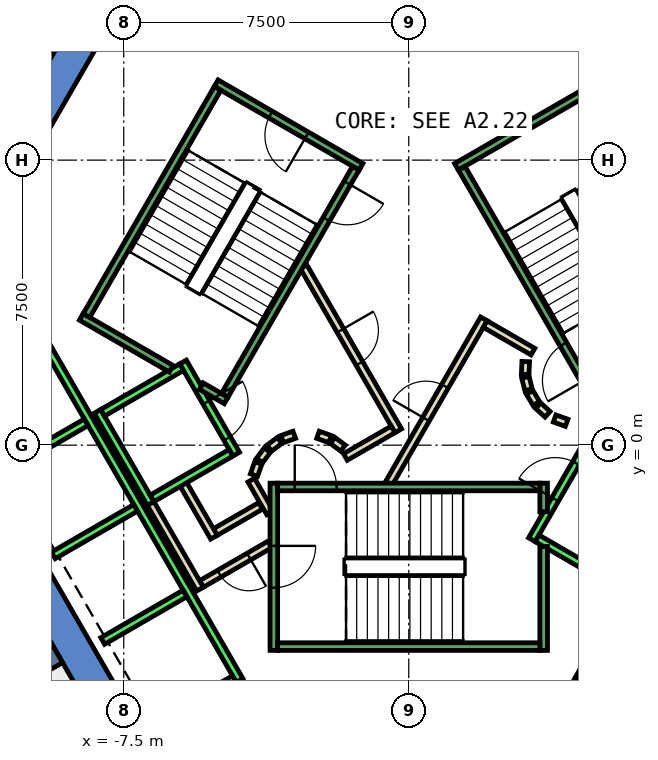
"""IFC4 building model, lengths in metres.
Left out: names, types, materials, properties, quantities, classifications, styles, units other than length and angle.
Written with IfcOpenShell. Run it as: python <this file> out.ifc"""

import sys

from ifc_helpers import new_model, si_unit, direction, frame, frame_2d, origin, place, context, subcontext, project, spatial, polyline, rectangle, outline, extrude, element, fill, save


model = new_model("IFC4")
c1 = context("Model", 3, precision=1e-05, world=origin(), true_north=direction((0.0, 1.0)))
c2 = subcontext(c1, "Body", "Model", "MODEL_VIEW")
j1 = project(units=[si_unit("LENGTHUNIT", "METRE"), si_unit("PLANEANGLEUNIT", "RADIAN")], contexts=[c1])
p1 = place(None, origin())
s1 = spatial("IfcSite", under=j1, at=p1, CompositionType="ELEMENT")
p2 = place(p1, origin())
s2 = spatial("IfcBuilding", under=s1, at=p2, CompositionType="ELEMENT")
p3 = place(p2, frame((0.0, 0.0, 103.4)))
s3 = spatial("IfcBuildingStorey", under=s2, at=p3, CompositionType="ELEMENT", Elevation=103.4)
p4 = place(p3, frame((0.0, 0.0, -0.4)))
e1 = element("IfcWall", 1, at=p4, inside=s3, PredefinedType="SHEAR", context=c2, shape_type="SweptSolid", body=[
    extrude(outline(polyline([(-12.267, 5.252), (-11.488, 4.802), (-6.409, 13.6), (-6.928, 14.5), (-12.267, 5.252)])), origin(), (0.0, 0.0, 1.0), 4.2),
])
p5 = place(p3, frame((0.0, 0.0, -0.4)))
e2 = element("IfcWall", 2, at=p5, inside=s3, PredefinedType="SHEAR", context=c2, shape_type="SweptSolid", body=[
    extrude(outline(polyline([(-13.856, 2.5), (-6.928, -9.5), (-6.409, -8.6), (-12.817, 2.5), (-13.856, 2.5)])), origin(), (0.0, 0.0, 1.0), 4.2),
])
p6 = place(p3, frame((-9.31, -5.375, -0.4), z_axis=(0.0, 0.0, 1.0), x_axis=(-0.866017533419, -0.500013631625, 0.0)))
e3 = element("IfcWall", 3, at=p6, inside=s3, PredefinedType="SHEAR", context=c2, shape_type="SweptSolid", body=[
    extrude(rectangle(XDim=9.0, YDim=0.8, at=frame_2d((4.5, 0.0))), origin(), (0.0, 0.0, 1.0), 4.2),
])
p7 = place(p3, frame((-3.9, -1.599, 0.0), z_axis=(0.0, 0.0, 1.0), x_axis=(-0.865969445389, -0.500096910261, 0.0)))
e4 = element("IfcWall", 4, at=p7, inside=s3, PredefinedType="PARTITIONING", context=c2, shape_type="SweptSolid", body=[
    extrude(rectangle(XDim=1.373, YDim=0.2, at=frame_2d((0.687, 0.0))), origin(), (0.0, 0.0, 1.0), 3.8),
])
p8 = place(p3, frame((-5.126, -2.422, 0.0), z_axis=(0.0, 0.0, 1.0), x_axis=(-0.500062241894, 0.865989465428, 0.0)))
e5 = element("IfcWall", 5, at=p8, inside=s3, PredefinedType="PARTITIONING", context=c2, shape_type="SweptSolid", body=[
    extrude(rectangle(XDim=1.7, YDim=0.2, at=frame_2d((0.85, 0.0))), origin(), (0.0, 0.0, 1.0), 3.8),
])
p9 = place(p3, frame((-3.65, -2.61, 0.0), z_axis=(0.0, 0.0, 1.0), x_axis=(-0.866072462134, -0.499918483688, 0.0)))
e6 = element("IfcWall", 6, at=p9, inside=s3, PredefinedType="PARTITIONING", context=c2, shape_type="SweptSolid", body=[
    extrude(rectangle(XDim=2.084, YDim=0.2, at=frame_2d((1.042, 0.0))), origin(), (0.0, 0.0, 1.0), 3.8),
])
p10 = place(p9, frame((0.642, 0.0, 0.0)))
e7 = element("IfcOpeningElement", 7, at=p10, cuts=e6, PredefinedType="OPENING", context=c2, shape_type="SweptSolid", body=[
    extrude(rectangle(XDim=0.9, YDim=2.1, at=frame_2d((0.45, 1.05))), frame((0.0, 0.11, 0.0), z_axis=(0.0, -1.0, 0.0), x_axis=(1.0, 0.0, 0.0)), (0.0, 0.0, 1.0), 0.22),
])
p11 = place(p3, frame((-5.492, -3.788, 0.0), z_axis=(0.0, 0.0, 1.0), x_axis=(-0.500008949224, 0.866020236886, 0.0)))
e8 = element("IfcWall", 8, at=p11, inside=s3, PredefinedType="PARTITIONING", context=c2, shape_type="SweptSolid", body=[
    extrude(rectangle(XDim=2.68, YDim=0.2, at=frame_2d((1.34, 0.0))), origin(), (0.0, 0.0, 1.0), 3.8),
])
p12 = place(p3, frame((-4.145, -0.92, 0.0), z_axis=(0.0, 0.0, 1.0), x_axis=(0.499743786207, -0.866173278362, 0.0)))
e9 = element("IfcWall", 9, at=p12, inside=s3, PredefinedType="PARTITIONING", context=c2, shape_type="SweptSolid", body=[
    extrude(rectangle(XDim=0.991, YDim=0.2, at=frame_2d((0.495, 0.0))), origin(), (0.0, 0.0, 1.0), 3.8),
])
p13 = place(p3, frame((-0.52, -1.0, 0.0), z_axis=(0.0, 0.0, 1.0), x_axis=(0.50011622646, 0.865958290007, 0.0)))
e10 = element("IfcWall", 10, at=p13, inside=s3, PredefinedType="PARTITIONING", context=c2, shape_type="SweptSolid", body=[
    extrude(rectangle(XDim=4.991, YDim=0.2, at=frame_2d((2.496, 0.0))), origin(), (0.0, 0.0, 1.0), 3.8),
])
p14 = place(p13, frame((1.945, 0.0, 0.0)))
e11 = element("IfcOpeningElement", 11, at=p14, cuts=e10, PredefinedType="OPENING", context=c2, shape_type="SweptSolid", body=[
    extrude(rectangle(XDim=1.0, YDim=2.1, at=frame_2d((0.5, 1.05))), frame((0.0, 0.11, 0.0), z_axis=(0.0, -1.0, 0.0), x_axis=(1.0, 0.0, 0.0)), (0.0, 0.0, 1.0), 0.22),
])
p15 = place(p3, frame((2.012, 3.186, 0.0), z_axis=(0.0, 0.0, 1.0), x_axis=(0.865891012941, -0.500232699559, 0.0)))
e12 = element("IfcWall", 12, at=p15, inside=s3, PredefinedType="PARTITIONING", context=c2, shape_type="SweptSolid", body=[
    extrude(rectangle(XDim=1.449, YDim=0.2, at=frame_2d((0.725, 0.0))), origin(), (0.0, 0.0, 1.0), 3.8),
])
p16 = place(p3, frame((3.079, 2.199, 0.0), z_axis=(0.0, 0.0, 1.0), x_axis=(-0.047771483479, -0.998858290933, 0.0)))
e13 = element("IfcWall", 13, at=p16, inside=s3, PredefinedType="PARTITIONING", context=c2, shape_type="SweptSolid", body=[
    extrude(rectangle(XDim=0.337, YDim=0.2, at=frame_2d((0.169, 0.0))), origin(), (0.0, 0.0, 1.0), 3.8),
])
p17 = place(p3, frame((3.07, 1.786, 0.0), z_axis=(0.0, 0.0, 1.0), x_axis=(0.242705583207, -0.970099994784, 0.0)))
e14 = element("IfcWall", 14, at=p17, inside=s3, PredefinedType="PARTITIONING", context=c2, shape_type="SweptSolid", body=[
    extrude(rectangle(XDim=0.338, YDim=0.2, at=frame_2d((0.169, 0.0))), origin(), (0.0, 0.0, 1.0), 3.8),
])
for number, where, z_axis, x_axis in (
    (15, (3.182, 1.388, 0.0), (0.0, 0.0, 1.0), (0.512, -0.859, 0.0)),
    (16, (3.404, 1.039, 0.0), (0.0, 0.0, 1.0), (0.74, -0.672, 0.0)),
):
    element("IfcWall", number, at=place(p3, frame(where, z_axis=z_axis, x_axis=x_axis)), inside=s3, PredefinedType="PARTITIONING", context=c2, shape_type="SweptSolid", body=[
        extrude(rectangle(XDim=0.338, YDim=0.2, at=frame_2d((0.169, 0.0))), origin(), (0.0, 0.0, 1.0), 3.8),
    ])
p18 = place(p3, frame((3.838, 0.702, 0.0), z_axis=(0.0, 0.0, 1.0), x_axis=(0.941035081519, -0.338308993895, 0.0)))
e17 = element("IfcWall", 17, at=p18, inside=s3, PredefinedType="PARTITIONING", context=c2, shape_type="SweptSolid", body=[
    extrude(rectangle(XDim=0.337, YDim=0.2, at=frame_2d((0.168, 0.0))), origin(), (0.0, 0.0, 1.0), 3.8),
])
p19 = place(p3, frame((-2.771, 4.7, 0.0), z_axis=(0.0, 0.0, 1.0), x_axis=(0.499969479948, -0.866043023828, 0.0)))
e18 = element("IfcWall", 18, at=p19, inside=s3, PredefinedType="PARTITIONING", context=c2, shape_type="SweptSolid", body=[
    extrude(rectangle(XDim=4.99, YDim=0.2, at=frame_2d((2.495, 0.0))), origin(), (0.0, 0.0, 1.0), 3.8),
])
p20 = place(p19, frame((1.945, 0.0, 0.0)))
e19 = element("IfcOpeningElement", 19, at=p20, cuts=e18, PredefinedType="OPENING", context=c2, shape_type="SweptSolid", body=[
    extrude(rectangle(XDim=1.0, YDim=2.1, at=frame_2d((0.5, 1.05))), frame((0.0, 0.11, 0.0), z_axis=(0.0, -1.0, 0.0), x_axis=(1.0, 0.0, 0.0)), (0.0, 0.0, 1.0), 0.22),
])
p21 = place(p3, frame((-0.412, 0.414, 0.0), z_axis=(0.0, 0.0, 1.0), x_axis=(-0.866017369001, -0.500013916395, 0.0)))
e20 = element("IfcWall", 20, at=p21, inside=s3, PredefinedType="PARTITIONING", context=c2, shape_type="SweptSolid", body=[
    extrude(rectangle(XDim=1.45, YDim=0.2, at=frame_2d((0.725, 0.0))), origin(), (0.0, 0.0, 1.0), 3.8),
])
p22 = place(p3, frame((-1.731, -0.077, 0.0), z_axis=(0.0, 0.0, 1.0), x_axis=(-0.804311165252, 0.594208338422, 0.0)))
e21 = element("IfcWall", 21, at=p22, inside=s3, PredefinedType="PARTITIONING", context=c2, shape_type="SweptSolid", body=[
    extrude(rectangle(XDim=0.338, YDim=0.2, at=frame_2d((0.169, 0.0))), origin(), (0.0, 0.0, 1.0), 3.8),
])
p23 = place(p3, frame((-2.07, 0.16, 0.0), z_axis=(0.0, 0.0, 1.0), x_axis=(-0.942199461132, 0.335052496547, 0.0)))
e22 = element("IfcWall", 22, at=p23, inside=s3, PredefinedType="PARTITIONING", context=c2, shape_type="SweptSolid", body=[
    extrude(rectangle(XDim=0.337, YDim=0.2, at=frame_2d((0.169, 0.0))), origin(), (0.0, 0.0, 1.0), 3.8),
])
p24 = place(p3, frame((-3.012, 0.273, 0.0), z_axis=(0.0, 0.0, 1.0), x_axis=(-0.942280615813, -0.334824194261, 0.0)))
e23 = element("IfcWall", 23, at=p24, inside=s3, PredefinedType="PARTITIONING", context=c2, shape_type="SweptSolid", body=[
    extrude(rectangle(XDim=0.338, YDim=0.2, at=frame_2d((0.169, 0.0))), origin(), (0.0, 0.0, 1.0), 3.8),
])
p25 = place(p3, frame((-3.397, 0.124, 0.0), z_axis=(0.0, 0.0, 1.0), x_axis=(-0.804311165252, -0.594208338422, 0.0)))
e24 = element("IfcWall", 24, at=p25, inside=s3, PredefinedType="PARTITIONING", context=c2, shape_type="SweptSolid", body=[
    extrude(rectangle(XDim=0.338, YDim=0.2, at=frame_2d((0.169, 0.0))), origin(), (0.0, 0.0, 1.0), 3.8),
])
p26 = place(p3, frame((-3.723, -0.131, 0.0), z_axis=(0.0, 0.0, 1.0), x_axis=(-0.594675113454, -0.803966112121, 0.0)))
e25 = element("IfcWall", 25, at=p26, inside=s3, PredefinedType="PARTITIONING", context=c2, shape_type="SweptSolid", body=[
    extrude(rectangle(XDim=0.338, YDim=0.2, at=frame_2d((0.169, 0.0))), origin(), (0.0, 0.0, 1.0), 3.8),
])
p27 = place(p3, frame((-3.96, -0.47, 0.0), z_axis=(0.0, 0.0, 1.0), x_axis=(-0.334824194261, -0.942280615813, 0.0)))
e26 = element("IfcWall", 26, at=p27, inside=s3, PredefinedType="PARTITIONING", context=c2, shape_type="SweptSolid", body=[
    extrude(rectangle(XDim=0.338, YDim=0.2, at=frame_2d((0.169, 0.0))), origin(), (0.0, 0.0, 1.0), 3.8),
])
p28 = place(p3, frame((-5.94, 2.188, 0.0), z_axis=(0.0, 0.0, 1.0), x_axis=(0.49994636267, -0.866056369097, 0.0)))
e27 = element("IfcWall", 27, at=p28, inside=s3, PredefinedType="STANDARD", context=c2, shape_type="SweptSolid", body=[
    extrude(rectangle(XDim=2.8, YDim=0.2, at=frame_2d((1.4, 0.0))), origin(), (0.0, 0.0, 1.0), 3.8),
])
p29 = place(p28, frame((1.225, 0.0, 0.0)))
e28 = element("IfcOpeningElement", 28, at=p29, cuts=e27, PredefinedType="OPENING", context=c2, shape_type="SweptSolid", body=[
    extrude(rectangle(XDim=1.1, YDim=2.1, at=frame_2d((0.55, 1.05))), frame((0.0, 0.11, 0.0), z_axis=(0.0, -1.0, 0.0), x_axis=(1.0, 0.0, 0.0)), (0.0, 0.0, 1.0), 0.22),
])
p30 = place(p3, frame((-8.192, 0.888, 0.0), z_axis=(0.0, 0.0, 1.0), x_axis=(0.49994636267, -0.866056369097, 0.0)))
e29 = element("IfcWall", 29, at=p30, inside=s3, PredefinedType="STANDARD", context=c2, shape_type="SweptSolid", body=[
    extrude(rectangle(XDim=2.8, YDim=0.2, at=frame_2d((1.4, 0.0))), origin(), (0.0, 0.0, 1.0), 3.8),
])
for number, where, z_axis, x_axis in (
    (30, (-5.977, 2.052, 0.0), (0.0, 0.0, 1.0), (-0.866, -0.5, 0.0)),
    (31, (-4.677, -0.2, 0.0), (0.0, 0.0, 1.0), (-0.866, -0.5, 0.0)),
):
    element("IfcWall", number, at=place(p3, frame(where, z_axis=z_axis, x_axis=x_axis)), inside=s3, PredefinedType="STANDARD", context=c2, shape_type="SweptSolid", body=[
        extrude(rectangle(XDim=2.399, YDim=0.2, at=frame_2d((1.2, 0.0))), origin(), (0.0, 0.0, 1.0), 3.8),
    ])
p31 = place(p3, frame((-9.751, 2.99, 0.0), z_axis=(0.0, 0.0, 1.0), x_axis=(0.50000090737, -0.866024879913, 0.0)))
e32 = element("IfcWall", 32, at=p31, inside=s3, PredefinedType="STANDARD", context=c2, shape_type="SweptSolid", body=[
    extrude(rectangle(XDim=10.6, YDim=0.2, at=frame_2d((5.3, 0.0))), origin(), (0.0, 0.0, 1.0), 3.8),
])
for number, where, z_axis, x_axis in (
    (33, (-8.488, 0.602, 0.0), (0.0, 0.0, 1.0), (-0.866, -0.5, 0.0)),
    (34, (-7.188, -1.65, 0.0), (0.0, 0.0, 1.0), (-0.866, -0.5, 0.0)),
    (35, (-5.888, -3.902, 0.0), (0.0, 0.0, 1.0), (-0.866, -0.5, 0.0)),
    (36, (-4.588, -6.153, 0.0), (0.0, 0.0, 1.0), (-0.866, -0.5, 0.0)),
):
    element("IfcWall", number, at=place(p3, frame(where, z_axis=z_axis, x_axis=x_axis)), inside=s3, PredefinedType="STANDARD", context=c2, shape_type="SweptSolid", body=[
        extrude(rectangle(XDim=2.5, YDim=0.2, at=frame_2d((1.25, 0.0))), origin(), (0.0, 0.0, 1.0), 3.8),
    ])
p32 = place(p3, frame((3.24, -2.488, 0.0), z_axis=(0.0, 0.0, 1.0), x_axis=(0.49994636267, 0.866056369097, 0.0)))
e37 = element("IfcWall", 37, at=p32, inside=s3, PredefinedType="STANDARD", context=c2, shape_type="SweptSolid", body=[
    extrude(rectangle(XDim=2.8, YDim=0.2, at=frame_2d((1.4, 0.0))), origin(), (0.0, 0.0, 1.0), 3.8),
])
p33 = place(p32, frame((1.225, 0.0, 0.0)))
e38 = element("IfcOpeningElement", 38, at=p33, cuts=e37, PredefinedType="OPENING", context=c2, shape_type="SweptSolid", body=[
    extrude(rectangle(XDim=1.1, YDim=2.1, at=frame_2d((0.55, 1.05))), frame((0.0, 0.11, 0.0), z_axis=(0.0, -1.0, 0.0), x_axis=(1.0, 0.0, 0.0)), (0.0, 0.0, 1.0), 0.22),
])
p34 = place(p3, frame((3.377, -2.452, 0.0), z_axis=(0.0, 0.0, 1.0), x_axis=(0.865955154139, -0.50012165622, 0.0)))
e39 = element("IfcWall", 39, at=p34, inside=s3, PredefinedType="STANDARD", context=c2, shape_type="SweptSolid", body=[
    extrude(rectangle(XDim=2.4, YDim=0.2, at=frame_2d((1.2, 0.0))), origin(), (0.0, 0.0, 1.0), 3.8),
])
p35 = place(p3, frame((4.451, -6.19, 0.0), z_axis=(0.0, 0.0, 1.0), x_axis=(0.50000090737, 0.866024879913, 0.0)))
e40 = element("IfcWall", 40, at=p35, inside=s3, PredefinedType="STANDARD", context=c2, shape_type="SweptSolid", body=[
    extrude(rectangle(XDim=10.6, YDim=0.2, at=frame_2d((5.3, 0.0))), origin(), (0.0, 0.0, 1.0), 3.8),
])
p36 = place(p3, frame((-3.55, -1.0, 0.0), z_axis=(0.0, 0.0, 1.0), x_axis=(0.0, -1.0, 0.0)))
e41 = element("IfcWall", 41, at=p36, inside=s3, PredefinedType="STANDARD", context=c2, shape_type="SweptSolid", body=[
    extrude(rectangle(XDim=4.4, YDim=0.2, at=frame_2d((2.2, 0.0))), origin(), (0.0, 0.0, 1.0), 3.8),
])
p37 = place(p36, frame((1.65, 0.0, 0.0)))
e42 = element("IfcOpeningElement", 42, at=p37, cuts=e41, PredefinedType="OPENING", context=c2, shape_type="SweptSolid", body=[
    extrude(rectangle(XDim=1.1, YDim=2.2, at=frame_2d((0.55, 1.1))), frame((0.0, 0.11, 0.0), z_axis=(0.0, -1.0, 0.0), x_axis=(1.0, 0.0, 0.0)), (0.0, 0.0, 1.0), 0.22),
])
p38 = place(p3, frame((3.55, -2.667, 0.0), z_axis=(0.0, 0.0, 1.0), x_axis=(0.0, -1.0, 0.0)))
e43 = element("IfcWall", 43, at=p38, inside=s3, PredefinedType="STANDARD", context=c2, shape_type="SweptSolid", body=[
    extrude(rectangle(XDim=2.733, YDim=0.2, at=frame_2d((1.366, 0.0))), origin(), (0.0, 0.0, 1.0), 3.8),
])
p39 = place(p3, frame((3.55, -1.0, 0.0), z_axis=(0.0, 0.0, 1.0), x_axis=(0.0, -1.0, 0.0)))
e44 = element("IfcWall", 44, at=p39, inside=s3, PredefinedType="STANDARD", context=c2, shape_type="SweptSolid", body=[
    extrude(rectangle(XDim=0.751, YDim=0.2, at=frame_2d((0.375, 0.0))), origin(), (0.0, 0.0, 1.0), 3.8),
])
p40 = place(p3, frame((-3.45, -1.1, 0.0), z_axis=(0.0, 0.0, 1.0), x_axis=(1.0, 0.0, 0.0)))
e45 = element("IfcWall", 45, at=p40, inside=s3, PredefinedType="STANDARD", context=c2, shape_type="SweptSolid", body=[
    extrude(rectangle(XDim=6.9, YDim=0.2, at=frame_2d((3.45, 0.0))), origin(), (0.0, 0.0, 1.0), 3.8),
])
p41 = place(p40, frame((0.45, 0.0, 0.0)))
e46 = element("IfcOpeningElement", 46, at=p41, cuts=e45, PredefinedType="OPENING", context=c2, shape_type="SweptSolid", body=[
    extrude(rectangle(XDim=1.1, YDim=2.2, at=frame_2d((0.55, 1.1))), frame((0.0, 0.11, 0.0), z_axis=(0.0, -1.0, 0.0), x_axis=(1.0, 0.0, 0.0)), (0.0, 0.0, 1.0), 0.22),
])
p42 = place(p3, frame((-3.45, -5.3, 0.0), z_axis=(0.0, 0.0, 1.0), x_axis=(1.0, 0.0, 0.0)))
e47 = element("IfcWall", 47, at=p42, inside=s3, PredefinedType="STANDARD", context=c2, shape_type="SweptSolid", body=[
    extrude(rectangle(XDim=6.9, YDim=0.2, at=frame_2d((3.45, 0.0))), origin(), (0.0, 0.0, 1.0), 3.8),
])
p43 = place(p3, frame((1.256, 7.324, 0.0), z_axis=(0.0, 0.0, 1.0), x_axis=(0.866046073146, 0.499964197906, 0.0)))
e48 = element("IfcWall", 48, at=p43, inside=s3, PredefinedType="STANDARD", context=c2, shape_type="SweptSolid", body=[
    extrude(rectangle(XDim=4.4, YDim=0.2, at=frame_2d((2.2, 0.0))), origin(), (0.0, 0.0, 1.0), 3.8),
])
p44 = place(p3, frame((4.843, 1.312, 0.0), z_axis=(0.0, 0.0, 1.0), x_axis=(-0.499963383562, 0.866046543262, 0.0)))
e49 = element("IfcWall", 49, at=p44, inside=s3, PredefinedType="STANDARD", context=c2, shape_type="SweptSolid", body=[
    extrude(rectangle(XDim=6.9, YDim=0.2, at=frame_2d((3.45, 0.0))), origin(), (0.0, 0.0, 1.0), 3.8),
])
p45 = place(p44, frame((0.45, 0.0, 0.0)))
e50 = element("IfcOpeningElement", 50, at=p45, cuts=e49, PredefinedType="OPENING", context=c2, shape_type="SweptSolid", body=[
    extrude(rectangle(XDim=1.1, YDim=2.2, at=frame_2d((0.55, 1.1))), frame((0.0, 0.11, 0.0), z_axis=(0.0, -1.0, 0.0), x_axis=(1.0, 0.0, 0.0)), (0.0, 0.0, 1.0), 0.22),
])
p46 = place(p3, frame((-1.256, 7.324, 0.0), z_axis=(0.0, 0.0, 1.0), x_axis=(-0.866046073146, 0.499964197906, 0.0)))
e51 = element("IfcWall", 51, at=p46, inside=s3, PredefinedType="STANDARD", context=c2, shape_type="SweptSolid", body=[
    extrude(rectangle(XDim=4.4, YDim=0.2, at=frame_2d((2.2, 0.0))), origin(), (0.0, 0.0, 1.0), 3.8),
])
p47 = place(p46, frame((1.65, 0.0, 0.0)))
e52 = element("IfcOpeningElement", 52, at=p47, cuts=e51, PredefinedType="OPENING", context=c2, shape_type="SweptSolid", body=[
    extrude(rectangle(XDim=1.1, YDim=2.2, at=frame_2d((0.55, 1.1))), frame((0.0, 0.11, 0.0), z_axis=(0.0, -1.0, 0.0), x_axis=(1.0, 0.0, 0.0)), (0.0, 0.0, 1.0), 0.22),
])
p48 = place(p3, frame((-6.25, 2.01, 0.0), z_axis=(0.0, 0.0, 1.0), x_axis=(-0.86611865017, 0.499838457731, 0.0)))
e53 = element("IfcWall", 53, at=p48, inside=s3, PredefinedType="STANDARD", context=c2, shape_type="SweptSolid", body=[
    extrude(rectangle(XDim=2.733, YDim=0.2, at=frame_2d((1.366, 0.0))), origin(), (0.0, 0.0, 1.0), 3.8),
])
p49 = place(p3, frame((-4.806, 1.176, 0.0), z_axis=(0.0, 0.0, 1.0), x_axis=(-0.866558586415, 0.499075361355, 0.0)))
e54 = element("IfcWall", 54, at=p49, inside=s3, PredefinedType="STANDARD", context=c2, shape_type="SweptSolid", body=[
    extrude(rectangle(XDim=0.751, YDim=0.2, at=frame_2d((0.376, 0.0))), origin(), (0.0, 0.0, 1.0), 3.8),
])
p50 = place(p3, frame((-1.393, 7.288, 0.0), z_axis=(0.0, 0.0, 1.0), x_axis=(-0.499963383562, -0.866046543262, 0.0)))
e55 = element("IfcWall", 55, at=p50, inside=s3, PredefinedType="STANDARD", context=c2, shape_type="SweptSolid", body=[
    extrude(rectangle(XDim=6.9, YDim=0.2, at=frame_2d((3.45, 0.0))), origin(), (0.0, 0.0, 1.0), 3.8),
])
p51 = place(p50, frame((0.45, 0.0, 0.0)))
e56 = element("IfcOpeningElement", 56, at=p51, cuts=e55, PredefinedType="OPENING", context=c2, shape_type="SweptSolid", body=[
    extrude(rectangle(XDim=1.1, YDim=2.2, at=frame_2d((0.55, 1.1))), frame((0.0, 0.11, 0.0), z_axis=(0.0, -1.0, 0.0), x_axis=(1.0, 0.0, 0.0)), (0.0, 0.0, 1.0), 0.22),
])
p52 = place(p3, frame((-5.03, 9.388, 0.0), z_axis=(0.0, 0.0, 1.0), x_axis=(-0.499978703459, -0.866037698999, 0.0)))
e57 = element("IfcWall", 57, at=p52, inside=s3, PredefinedType="STANDARD", context=c2, shape_type="SweptSolid", body=[
    extrude(rectangle(XDim=6.9, YDim=0.2, at=frame_2d((3.45, 0.0))), origin(), (0.0, 0.0, 1.0), 3.8),
])
p53 = place(p14, origin())
e58 = element("IfcDoor", 58, at=p53, inside=s3, OperationType="SINGLE_SWING_LEFT", PredefinedType="DOOR", context=c2, shape_type="SweptSolid", body=[
    extrude(rectangle(XDim=1.0, YDim=2.1, at=frame_2d((0.5, 1.05))), frame((0.0, 0.025, 0.0), z_axis=(0.0, -1.0, 0.0), x_axis=(1.0, 0.0, 0.0)), (0.0, 0.0, 1.0), 0.05),
])
fill(e11, e58)
p54 = place(p20, origin())
e59 = element("IfcDoor", 59, at=p54, inside=s3, OperationType="SINGLE_SWING_RIGHT", PredefinedType="DOOR", context=c2, shape_type="SweptSolid", body=[
    extrude(rectangle(XDim=1.0, YDim=2.1, at=frame_2d((0.5, 1.05))), frame((0.0, 0.025, 0.0), z_axis=(0.0, -1.0, 0.0), x_axis=(1.0, 0.0, 0.0)), (0.0, 0.0, 1.0), 0.05),
])
fill(e19, e59)
p55 = place(p10, origin())
e60 = element("IfcDoor", 60, at=p55, inside=s3, OperationType="SINGLE_SWING_LEFT", PredefinedType="DOOR", context=c2, shape_type="SweptSolid", body=[
    extrude(rectangle(XDim=0.9, YDim=2.1, at=frame_2d((0.45, 1.05))), frame((0.0, 0.025, 0.0), z_axis=(0.0, -1.0, 0.0), x_axis=(1.0, 0.0, 0.0)), (0.0, 0.0, 1.0), 0.05),
])
fill(e7, e60)
p56 = place(p33, origin())
e61 = element("IfcDoor", 61, at=p56, inside=s3, OperationType="SLIDING_TO_LEFT", PredefinedType="DOOR", context=c2, shape_type="SweptSolid", body=[
    extrude(rectangle(XDim=1.1, YDim=2.1, at=frame_2d((0.55, 1.05))), frame((0.0, 0.025, 0.0), z_axis=(0.0, -1.0, 0.0), x_axis=(1.0, 0.0, 0.0)), (0.0, 0.0, 1.0), 0.05),
])
fill(e38, e61)
p57 = place(p29, origin())
e62 = element("IfcDoor", 62, at=p57, inside=s3, OperationType="SLIDING_TO_LEFT", PredefinedType="DOOR", context=c2, shape_type="SweptSolid", body=[
    extrude(rectangle(XDim=1.1, YDim=2.1, at=frame_2d((0.55, 1.05))), frame((0.0, 0.025, 0.0), z_axis=(0.0, -1.0, 0.0), x_axis=(1.0, 0.0, 0.0)), (0.0, 0.0, 1.0), 0.05),
])
fill(e28, e62)
p58 = place(p41, origin())
e63 = element("IfcDoor", 63, at=p58, inside=s3, OperationType="SINGLE_SWING_LEFT", PredefinedType="DOOR", context=c2, shape_type="SweptSolid", body=[
    extrude(rectangle(XDim=1.1, YDim=2.2, at=frame_2d((0.55, 1.1))), frame((0.0, 0.025, 0.0), z_axis=(0.0, -1.0, 0.0), x_axis=(1.0, 0.0, 0.0)), (0.0, 0.0, 1.0), 0.05),
])
fill(e46, e63)
p59 = place(p37, origin())
e64 = element("IfcDoor", 64, at=p59, inside=s3, OperationType="SINGLE_SWING_LEFT", PredefinedType="DOOR", context=c2, shape_type="SweptSolid", body=[
    extrude(rectangle(XDim=1.1, YDim=2.2, at=frame_2d((0.55, 1.1))), frame((0.0, 0.025, 0.0), z_axis=(0.0, -1.0, 0.0), x_axis=(1.0, 0.0, 0.0)), (0.0, 0.0, 1.0), 0.05),
])
fill(e42, e64)
p60 = place(p45, origin())
e65 = element("IfcDoor", 65, at=p60, inside=s3, OperationType="SINGLE_SWING_LEFT", PredefinedType="DOOR", context=c2, shape_type="SweptSolid", body=[
    extrude(rectangle(XDim=1.1, YDim=2.2, at=frame_2d((0.55, 1.1))), frame((0.0, 0.025, 0.0), z_axis=(0.0, -1.0, 0.0), x_axis=(1.0, 0.0, 0.0)), (0.0, 0.0, 1.0), 0.05),
])
fill(e50, e65)
p61 = place(p51, origin())
e66 = element("IfcDoor", 66, at=p61, inside=s3, OperationType="SINGLE_SWING_LEFT", PredefinedType="DOOR", context=c2, shape_type="SweptSolid", body=[
    extrude(rectangle(XDim=1.1, YDim=2.2, at=frame_2d((0.55, 1.1))), frame((0.0, 0.025, 0.0), z_axis=(0.0, -1.0, 0.0), x_axis=(1.0, 0.0, 0.0)), (0.0, 0.0, 1.0), 0.05),
])
fill(e56, e66)
p62 = place(p47, origin())
e67 = element("IfcDoor", 67, at=p62, inside=s3, OperationType="SINGLE_SWING_LEFT", PredefinedType="DOOR", context=c2, shape_type="SweptSolid", body=[
    extrude(rectangle(XDim=1.1, YDim=2.2, at=frame_2d((0.55, 1.1))), frame((0.0, 0.025, 0.0), z_axis=(0.0, -1.0, 0.0), x_axis=(1.0, 0.0, 0.0)), (0.0, 0.0, 1.0), 0.05),
])
fill(e52, e67)
save(model, sys.argv[1])
